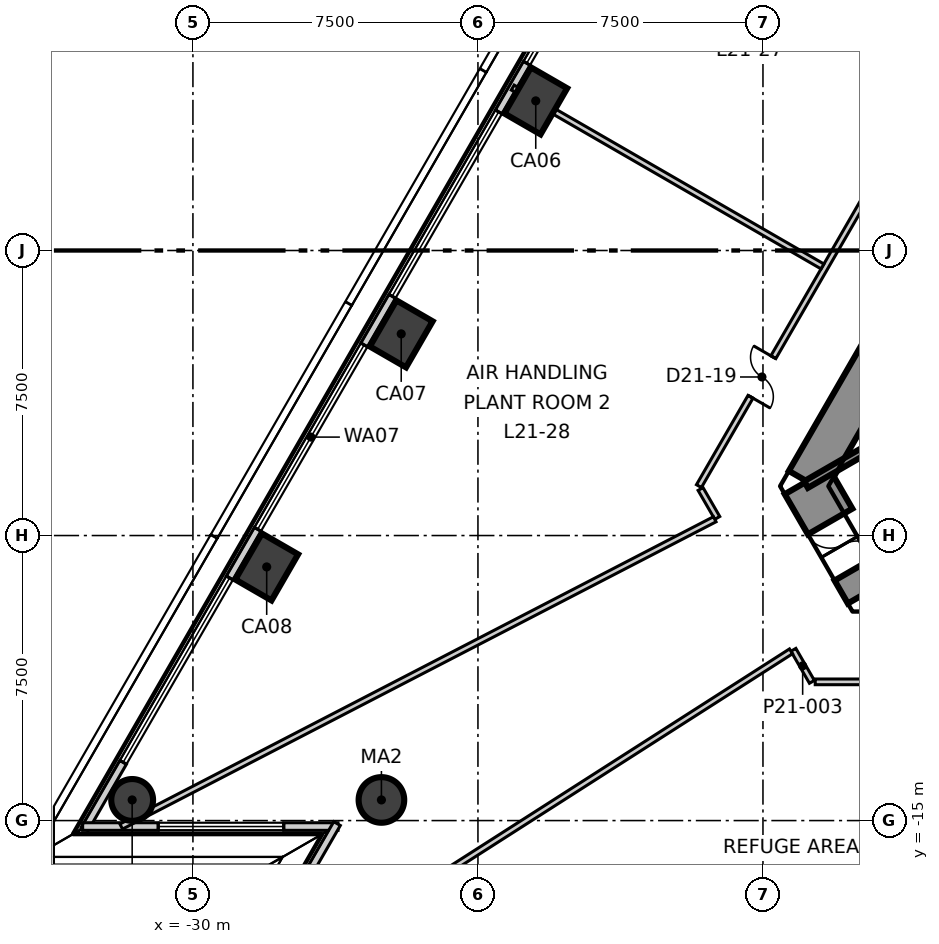
"""IFC4 building model, lengths in metres.
Left out: names, types, materials, properties, quantities, classifications, styles, units other than length and angle.
Written with IfcOpenShell. Run it as: python <this file> out.ifc"""

import sys

from ifc_helpers import new_model, si_unit, direction, frame, frame_2d, origin, origin_2d, place, context, subcontext, project, spatial, polyline, rectangle, circle, outline, extrude, element, fill, save


model = new_model("IFC4")
c1 = context("Model", 3, precision=1e-05, world=origin(), true_north=direction((0.0, 1.0)))
c2 = subcontext(c1, "Body", "Model", "MODEL_VIEW")
j1 = project(units=[si_unit("LENGTHUNIT", "METRE"), si_unit("PLANEANGLEUNIT", "RADIAN")], contexts=[c1])
p1 = place(None, origin())
s1 = spatial("IfcSite", under=j1, at=p1, CompositionType="ELEMENT")
p2 = place(p1, origin())
s2 = spatial("IfcBuilding", under=s1, at=p2, CompositionType="ELEMENT")
p3 = place(p2, frame((0.0, 0.0, 95.3)))
s3 = spatial("IfcBuildingStorey", under=s2, at=p3, CompositionType="ELEMENT", Elevation=95.3)
p4 = place(p3, frame((-1.66, 15.025, -0.3), z_axis=(0.0, 0.0, 1.0), x_axis=(-0.500003780125, -0.866023221317, 0.0)))
e1 = element("IfcWall", 1, at=p4, inside=s3, PredefinedType="SHEAR", context=c2, shape_type="SweptSolid", body=[
    extrude(outline(polyline([(-0.462, -0.55), (1.483, -0.55), (3.428, -0.55), (5.374, -0.55), (7.319, -0.55), (9.264, -0.55), (11.209, -0.55), (13.155, -0.55), (15.1, -0.55), (17.045, -0.55), (18.99, -0.55), (20.936, -0.55), (22.881, -0.55), (24.826, -0.55), (23.902, 0.55), (21.949, 0.55), (19.995, 0.55), (18.042, 0.55), (16.089, 0.55), (14.135, 0.55), (12.182, 0.55), (10.229, 0.55), (8.275, 0.55), (6.322, 0.55), (4.369, 0.55), (2.415, 0.55), (0.462, 0.55), (-0.462, -0.55)])), origin(), (0.0, 0.0, 1.0), 4.2),
])
p5 = place(p4, frame((11.776, 0.0, 0.3)))
e2 = element("IfcOpeningElement", 2, at=p5, cuts=e1, PredefinedType="OPENING", context=c2, shape_type="SweptSolid", body=[
    extrude(rectangle(XDim=1.1, YDim=2.1, at=frame_2d((0.55, 1.05))), frame((0.0, 0.56, 0.0), z_axis=(0.0, -1.0, 0.0), x_axis=(1.0, 0.0, 0.0)), (0.0, 0.0, 1.0), 1.12),
])
p6 = place(p3, frame((-13.842, -6.075, -0.3), z_axis=(0.0, 0.0, 1.0), x_axis=(0.500061949227, -0.865989634427, 0.0)))
e3 = element("IfcWall", 3, at=p6, inside=s3, PredefinedType="SHEAR", context=c2, shape_type="SweptSolid", body=[
    extrude(outline(polyline([(-0.245, -0.675), (1.66, -0.675), (3.565, -0.675), (3.075, 0.675), (1.66, 0.675), (0.245, 0.675), (-0.245, -0.675)])), origin(), (0.0, 0.0, 1.0), 4.2),
])
p7 = place(p6, frame((1.221, 0.0, 0.3)))
e4 = element("IfcOpeningElement", 4, at=p7, cuts=e3, PredefinedType="OPENING", context=c2, shape_type="SweptSolid", body=[
    extrude(rectangle(XDim=1.4, YDim=2.1, at=frame_2d((0.7, 1.05))), frame((0.0, 0.685, 0.0), z_axis=(0.0, -1.0, 0.0), x_axis=(1.0, 0.0, 0.0)), (0.0, 0.0, 1.0), 1.37),
])
p8 = place(p3, frame((-12.182, -8.95, -0.3), z_axis=(0.0, 0.0, 1.0), x_axis=(1.0, 0.0, 0.0)))
e5 = element("IfcWall", 5, at=p8, inside=s3, PredefinedType="SHEAR", context=c2, shape_type="SweptSolid", body=[
    extrude(outline(polyline([(-0.462, -0.55), (1.483, -0.55), (3.428, -0.55), (5.374, -0.55), (7.319, -0.55), (9.264, -0.55), (11.209, -0.55), (13.155, -0.55), (15.1, -0.55), (17.045, -0.55), (18.99, -0.55), (20.936, -0.55), (22.881, -0.55), (24.826, -0.55), (23.902, 0.55), (21.949, 0.55), (19.995, 0.55), (18.042, 0.55), (16.089, 0.55), (14.135, 0.55), (12.182, 0.55), (10.229, 0.55), (8.275, 0.55), (6.322, 0.55), (4.369, 0.55), (2.415, 0.55), (0.462, 0.55), (-0.462, -0.55)])), origin(), (0.0, 0.0, 1.0), 4.2),
])
for number, where, z_axis, x_axis in (
    (6, (-20.979, 3.937, -0.3), (0.0, 0.0, 1.0), (0.5, 0.866, 0.0)),
    (7, (-24.519, -2.194, -0.3), (0.0, 0.0, 1.0), (0.5, 0.866, 0.0)),
    (8, (-28.059, -8.326, -0.3), (0.0, 0.0, 1.0), (0.5, 0.866, 0.0)),
):
    element("IfcColumn", number, at=place(p3, frame(where, z_axis=z_axis, x_axis=x_axis)), inside=s3, PredefinedType="COLUMN", context=c2, shape_type="SweptSolid", body=[
        extrude(rectangle(XDim=1.4, YDim=1.1, at=origin_2d()), origin(), (0.0, 0.0, 1.0), 4.2),
    ])
p9 = place(p3, frame((-31.599, -14.457, -0.3), z_axis=(0.0, 0.0, 1.0), x_axis=(0.5, 0.866025403784, 0.0)))
e9 = element("IfcColumn", 9, at=p9, inside=s3, PredefinedType="COLUMN", context=c2, shape_type="SweptSolid", body=[
    extrude(circle(Radius=0.55, at=origin_2d()), origin(), (0.0, 0.0, 1.0), 4.2),
])
p10 = place(p3, frame((-25.04, -14.457, -0.3), z_axis=(0.0, 0.0, 1.0), x_axis=(1.0, 0.0, 0.0)))
e10 = element("IfcColumn", 10, at=p10, inside=s3, PredefinedType="COLUMN", context=c2, shape_type="SweptSolid", body=[
    extrude(circle(Radius=0.6, at=origin_2d()), origin(), (0.0, 0.0, 1.0), 4.2),
])
p11 = place(p3, frame((-3.234, 36.072, 0.0), z_axis=(0.0, 0.0, 1.0), x_axis=(-0.500009108245, -0.866020145073, 0.0)))
e11 = element("IfcWall", 11, at=p11, inside=s3, PredefinedType="ELEMENTEDWALL", context=c2, shape_type="SweptSolid", body=[
    extrude(rectangle(XDim=59.225, YDim=0.2, at=frame_2d((29.613, 0.0))), origin(), (0.0, 0.0, 1.0), 3.9),
])
p12 = place(p11, frame((2.042, 0.0, 0.9)))
e12 = element("IfcOpeningElement", 12, at=p12, cuts=e11, PredefinedType="OPENING", context=c2, shape_type="SweptSolid", body=[
    extrude(rectangle(XDim=5.6, YDim=2.5, at=frame_2d((2.8, 1.25))), frame((0.0, 0.11, 0.0), z_axis=(0.0, -1.0, 0.0), x_axis=(1.0, 0.0, 0.0)), (0.0, 0.0, 1.0), 0.22),
])
p13 = place(p11, frame((9.122, 0.0, 0.9)))
e13 = element("IfcOpeningElement", 13, at=p13, cuts=e11, PredefinedType="OPENING", context=c2, shape_type="SweptSolid", body=[
    extrude(rectangle(XDim=5.6, YDim=2.5, at=frame_2d((2.8, 1.25))), frame((0.0, 0.11, 0.0), z_axis=(0.0, -1.0, 0.0), x_axis=(1.0, 0.0, 0.0)), (0.0, 0.0, 1.0), 0.22),
])
p14 = place(p11, frame((16.202, 0.0, 0.9)))
e14 = element("IfcOpeningElement", 14, at=p14, cuts=e11, PredefinedType="OPENING", context=c2, shape_type="SweptSolid", body=[
    extrude(rectangle(XDim=5.6, YDim=2.5, at=frame_2d((2.8, 1.25))), frame((0.0, 0.11, 0.0), z_axis=(0.0, -1.0, 0.0), x_axis=(1.0, 0.0, 0.0)), (0.0, 0.0, 1.0), 0.22),
])
p15 = place(p11, frame((23.282, 0.0, 0.9)))
e15 = element("IfcOpeningElement", 15, at=p15, cuts=e11, PredefinedType="OPENING", context=c2, shape_type="SweptSolid", body=[
    extrude(rectangle(XDim=5.6, YDim=2.5, at=frame_2d((2.8, 1.25))), frame((0.0, 0.11, 0.0), z_axis=(0.0, -1.0, 0.0), x_axis=(1.0, 0.0, 0.0)), (0.0, 0.0, 1.0), 0.22),
])
p16 = place(p11, frame((30.362, 0.0, 0.9)))
e16 = element("IfcOpeningElement", 16, at=p16, cuts=e11, PredefinedType="OPENING", context=c2, shape_type="SweptSolid", body=[
    extrude(rectangle(XDim=5.6, YDim=2.5, at=frame_2d((2.8, 1.25))), frame((0.0, 0.11, 0.0), z_axis=(0.0, -1.0, 0.0), x_axis=(1.0, 0.0, 0.0)), (0.0, 0.0, 1.0), 0.22),
])
p17 = place(p11, frame((37.442, 0.0, 0.9)))
e17 = element("IfcOpeningElement", 17, at=p17, cuts=e11, PredefinedType="OPENING", context=c2, shape_type="SweptSolid", body=[
    extrude(rectangle(XDim=5.6, YDim=2.5, at=frame_2d((2.8, 1.25))), frame((0.0, 0.11, 0.0), z_axis=(0.0, -1.0, 0.0), x_axis=(1.0, 0.0, 0.0)), (0.0, 0.0, 1.0), 0.22),
])
p18 = place(p11, frame((44.522, 0.0, 0.9)))
e18 = element("IfcOpeningElement", 18, at=p18, cuts=e11, PredefinedType="OPENING", context=c2, shape_type="SweptSolid", body=[
    extrude(rectangle(XDim=5.6, YDim=2.5, at=frame_2d((2.8, 1.25))), frame((0.0, 0.11, 0.0), z_axis=(0.0, -1.0, 0.0), x_axis=(1.0, 0.0, 0.0)), (0.0, 0.0, 1.0), 0.22),
])
p19 = place(p11, frame((51.602, 0.0, 0.9)))
e19 = element("IfcOpeningElement", 19, at=p19, cuts=e11, PredefinedType="OPENING", context=c2, shape_type="SweptSolid", body=[
    extrude(rectangle(XDim=5.6, YDim=2.5, at=frame_2d((2.8, 1.25))), frame((0.0, 0.11, 0.0), z_axis=(0.0, -1.0, 0.0), x_axis=(1.0, 0.0, 0.0)), (0.0, 0.0, 1.0), 0.22),
])
p20 = place(p3, frame((-32.902, -15.157, 0.0), z_axis=(0.0, 0.0, 1.0), x_axis=(1.0, 0.0, 0.0)))
e20 = element("IfcWall", 20, at=p20, inside=s3, PredefinedType="ELEMENTEDWALL", context=c2, shape_type="SweptSolid", body=[
    extrude(rectangle(XDim=6.719, YDim=0.2, at=frame_2d((3.359, 0.0))), origin(), (0.0, 0.0, 1.0), 3.9),
])
p21 = place(p20, frame((1.99, 0.0, 0.9)))
e21 = element("IfcOpeningElement", 21, at=p21, cuts=e20, PredefinedType="OPENING", context=c2, shape_type="SweptSolid", body=[
    extrude(rectangle(XDim=3.3, YDim=2.5, at=frame_2d((1.65, 1.25))), frame((0.0, 0.11, 0.0), z_axis=(0.0, -1.0, 0.0), x_axis=(1.0, 0.0, 0.0)), (0.0, 0.0, 1.0), 0.22),
])
p22 = place(p3, frame((-26.208, -15.079, 0.0), z_axis=(0.0, 0.0, 1.0), x_axis=(-0.49993005842, -0.866065780809, 0.0)))
e22 = element("IfcWall", 22, at=p22, inside=s3, PredefinedType="ELEMENTEDWALL", context=c2, shape_type="SweptSolid", body=[
    extrude(rectangle(XDim=6.719, YDim=0.2, at=frame_2d((3.359, 0.0))), origin(), (0.0, 0.0, 1.0), 3.9),
])
p23 = place(p22, frame((1.39, 0.0, 0.9)))
e23 = element("IfcOpeningElement", 23, at=p23, cuts=e22, PredefinedType="OPENING", context=c2, shape_type="SweptSolid", body=[
    extrude(rectangle(XDim=3.3, YDim=2.5, at=frame_2d((1.65, 1.25))), frame((0.0, 0.11, 0.0), z_axis=(0.0, -1.0, 0.0), x_axis=(1.0, 0.0, 0.0)), (0.0, 0.0, 1.0), 0.22),
])
p24 = place(p3, frame((-16.685, -6.2, 0.0), z_axis=(0.0, 0.0, 1.0), x_axis=(0.500002442456, 0.866023993627, 0.0)))
e24 = element("IfcWall", 24, at=p24, inside=s3, PredefinedType="PARTITIONING", context=c2, shape_type="SweptSolid", body=[
    extrude(rectangle(XDim=27.424, YDim=0.15, at=frame_2d((13.712, 0.0))), origin(), (0.0, 0.0, 1.0), 3.9),
])
p25 = place(p24, frame((23.508, 0.0, 0.0)))
e25 = element("IfcOpeningElement", 25, at=p25, cuts=e24, PredefinedType="OPENING", context=c2, shape_type="SweptSolid", body=[
    extrude(rectangle(XDim=1.2, YDim=2.1, at=frame_2d((0.6, 1.05))), frame((0.0, 0.085, 0.0), z_axis=(0.0, -1.0, 0.0), x_axis=(1.0, 0.0, 0.0)), (0.0, 0.0, 1.0), 0.17),
])
p26 = place(p24, frame((13.112, 0.0, 0.0)))
e26 = element("IfcOpeningElement", 26, at=p26, cuts=e24, PredefinedType="OPENING", context=c2, shape_type="SweptSolid", body=[
    extrude(rectangle(XDim=1.2, YDim=2.1, at=frame_2d((0.6, 1.05))), frame((0.0, 0.085, 0.0), z_axis=(0.0, -1.0, 0.0), x_axis=(1.0, 0.0, 0.0)), (0.0, 0.0, 1.0), 0.17),
])
p27 = place(p24, frame((2.716, 0.0, 0.0)))
e27 = element("IfcOpeningElement", 27, at=p27, cuts=e24, PredefinedType="OPENING", context=c2, shape_type="SweptSolid", body=[
    extrude(rectangle(XDim=1.2, YDim=2.1, at=frame_2d((0.6, 1.05))), frame((0.0, 0.085, 0.0), z_axis=(0.0, -1.0, 0.0), x_axis=(1.0, 0.0, 0.0)), (0.0, 0.0, 1.0), 0.17),
])
p28 = place(p3, frame((-16.642, -6.275, 0.0), z_axis=(0.0, 0.0, 1.0), x_axis=(0.50010660371, -0.865963847355, 0.0)))
e28 = element("IfcWall", 28, at=p28, inside=s3, PredefinedType="PARTITIONING", context=c2, shape_type="SweptSolid", body=[
    extrude(rectangle(XDim=0.88, YDim=0.15, at=frame_2d((0.44, 0.0))), origin(), (0.0, 0.0, 1.0), 3.9),
])
p29 = place(p3, frame((-14.199, -10.507, 0.0), z_axis=(0.0, 0.0, 1.0), x_axis=(0.500265064493, -0.865872314633, 0.0)))
e29 = element("IfcWall", 29, at=p29, inside=s3, PredefinedType="PARTITIONING", context=c2, shape_type="SweptSolid", body=[
    extrude(rectangle(XDim=0.974, YDim=0.15, at=frame_2d((0.487, 0.0))), origin(), (0.0, 0.0, 1.0), 3.9),
])
p30 = place(p3, frame((-31.887, -15.157, 0.0), z_axis=(0.0, 0.0, 1.0), x_axis=(0.88806151424, 0.459724642503, 0.0)))
e30 = element("IfcWall", 30, at=p30, inside=s3, PredefinedType="PARTITIONING", context=c2, shape_type="SweptSolid", body=[
    extrude(rectangle(XDim=17.586, YDim=0.15, at=frame_2d((8.793, 0.0))), origin(), (0.0, 0.0, 1.0), 3.1),
])
p31 = place(p3, frame((-29.054, -20.01, 0.0), z_axis=(0.0, 0.0, 1.0), x_axis=(0.842374405573, 0.53889271737, 0.0)))
e31 = element("IfcWall", 31, at=p31, inside=s3, PredefinedType="PARTITIONING", context=c2, shape_type="SweptSolid", body=[
    extrude(rectangle(XDim=17.56, YDim=0.15, at=frame_2d((8.78, 0.0))), origin(), (0.0, 0.0, 1.0), 3.1),
])
p32 = place(p3, frame((-13.625, -11.35, 0.0), z_axis=(0.0, 0.0, 1.0), x_axis=(1.0, 0.0, 0.0)))
e32 = element("IfcWall", 32, at=p32, inside=s3, PredefinedType="PARTITIONING", context=c2, shape_type="SweptSolid", body=[
    extrude(rectangle(XDim=27.337, YDim=0.15, at=frame_2d((13.668, 0.0))), origin(), (0.0, 0.0, 1.0), 3.9),
])
p33 = place(p32, frame((2.629, 0.0, 0.0)))
e33 = element("IfcOpeningElement", 33, at=p33, cuts=e32, PredefinedType="OPENING", context=c2, shape_type="SweptSolid", body=[
    extrude(rectangle(XDim=1.2, YDim=2.1, at=frame_2d((0.6, 1.05))), frame((0.0, 0.085, 0.0), z_axis=(0.0, -1.0, 0.0), x_axis=(1.0, 0.0, 0.0)), (0.0, 0.0, 1.0), 0.17),
])
p34 = place(p32, frame((13.025, 0.0, 0.0)))
e34 = element("IfcOpeningElement", 34, at=p34, cuts=e32, PredefinedType="OPENING", context=c2, shape_type="SweptSolid", body=[
    extrude(rectangle(XDim=1.2, YDim=2.1, at=frame_2d((0.6, 1.05))), frame((0.0, 0.085, 0.0), z_axis=(0.0, -1.0, 0.0), x_axis=(1.0, 0.0, 0.0)), (0.0, 0.0, 1.0), 0.17),
])
p35 = place(p32, frame((23.421, 0.0, 0.0)))
e35 = element("IfcOpeningElement", 35, at=p35, cuts=e32, PredefinedType="OPENING", context=c2, shape_type="SweptSolid", body=[
    extrude(rectangle(XDim=1.2, YDim=2.1, at=frame_2d((0.6, 1.05))), frame((0.0, 0.085, 0.0), z_axis=(0.0, -1.0, 0.0), x_axis=(1.0, 0.0, 0.0)), (0.0, 0.0, 1.0), 0.17),
])
p36 = place(p3, frame((-21.585, 4.287, 0.0), z_axis=(0.0, 0.0, 1.0), x_axis=(0.866018845103, -0.500011359798, 0.0)))
e36 = element("IfcWall", 36, at=p36, inside=s3, PredefinedType="PARTITIONING", context=c2, shape_type="SweptSolid", body=[
    extrude(rectangle(XDim=9.412, YDim=0.15, at=frame_2d((4.706, 0.0))), origin(), (0.0, 0.0, 1.0), 3.9),
])
p37 = place(p3, frame((-13.867, -6.159, 0.0), z_axis=(0.0, 0.0, 1.0), x_axis=(0.866010926821, 0.500025073997, 0.0)))
e37 = element("IfcWall", 37, at=p37, inside=s3, PredefinedType="SOLIDWALL", context=c2, shape_type="SweptSolid", body=[
    extrude(rectangle(XDim=8.473, YDim=0.2, at=frame_2d((4.237, 0.0))), origin(), (0.0, 0.0, 1.0), 3.9),
])
p38 = place(p16, origin())
e38 = element("IfcWindow", 38, at=p38, inside=s3, PartitioningType="SINGLE_PANEL", PredefinedType="WINDOW", context=c2, shape_type="SweptSolid", body=[
    extrude(rectangle(XDim=5.6, YDim=2.5, at=frame_2d((2.8, 1.25))), frame((0.0, 0.03, 0.0), z_axis=(0.0, -1.0, 0.0), x_axis=(1.0, 0.0, 0.0)), (0.0, 0.0, 1.0), 0.06),
])
fill(e16, e38)
p39 = place(p17, origin())
e39 = element("IfcWindow", 39, at=p39, inside=s3, PartitioningType="SINGLE_PANEL", PredefinedType="WINDOW", context=c2, shape_type="SweptSolid", body=[
    extrude(rectangle(XDim=5.6, YDim=2.5, at=frame_2d((2.8, 1.25))), frame((0.0, 0.03, 0.0), z_axis=(0.0, -1.0, 0.0), x_axis=(1.0, 0.0, 0.0)), (0.0, 0.0, 1.0), 0.06),
])
fill(e17, e39)
p40 = place(p18, origin())
e40 = element("IfcWindow", 40, at=p40, inside=s3, PartitioningType="SINGLE_PANEL", PredefinedType="WINDOW", context=c2, shape_type="SweptSolid", body=[
    extrude(rectangle(XDim=5.6, YDim=2.5, at=frame_2d((2.8, 1.25))), frame((0.0, 0.03, 0.0), z_axis=(0.0, -1.0, 0.0), x_axis=(1.0, 0.0, 0.0)), (0.0, 0.0, 1.0), 0.06),
])
fill(e18, e40)
p41 = place(p19, origin())
e41 = element("IfcWindow", 41, at=p41, inside=s3, PartitioningType="SINGLE_PANEL", PredefinedType="WINDOW", context=c2, shape_type="SweptSolid", body=[
    extrude(rectangle(XDim=5.6, YDim=2.5, at=frame_2d((2.8, 1.25))), frame((0.0, 0.03, 0.0), z_axis=(0.0, -1.0, 0.0), x_axis=(1.0, 0.0, 0.0)), (0.0, 0.0, 1.0), 0.06),
])
fill(e19, e41)
p42 = place(p21, origin())
e42 = element("IfcWindow", 42, at=p42, inside=s3, PartitioningType="SINGLE_PANEL", PredefinedType="WINDOW", context=c2, shape_type="SweptSolid", body=[
    extrude(rectangle(XDim=3.3, YDim=2.5, at=frame_2d((1.65, 1.25))), frame((0.0, 0.03, 0.0), z_axis=(0.0, -1.0, 0.0), x_axis=(1.0, 0.0, 0.0)), (0.0, 0.0, 1.0), 0.06),
])
fill(e21, e42)
p43 = place(p27, origin())
e43 = element("IfcDoor", 43, at=p43, inside=s3, OperationType="DOUBLE_DOOR_SINGLE_SWING", PredefinedType="DOOR", context=c2, shape_type="SweptSolid", body=[
    extrude(rectangle(XDim=1.2, YDim=2.1, at=frame_2d((0.6, 1.05))), frame((0.0, 0.025, 0.0), z_axis=(0.0, -1.0, 0.0), x_axis=(1.0, 0.0, 0.0)), (0.0, 0.0, 1.0), 0.05),
])
fill(e27, e43)
p44 = place(p7, origin())
e44 = element("IfcDoor", 44, at=p44, inside=s3, OperationType="DOUBLE_DOOR_SINGLE_SWING", PredefinedType="DOOR", context=c2, shape_type="SweptSolid", body=[
    extrude(rectangle(XDim=1.4, YDim=2.1, at=frame_2d((0.7, 1.05))), frame((0.0, 0.025, 0.0), z_axis=(0.0, -1.0, 0.0), x_axis=(1.0, 0.0, 0.0)), (0.0, 0.0, 1.0), 0.05),
])
fill(e4, e44)
save(model, sys.argv[1])
